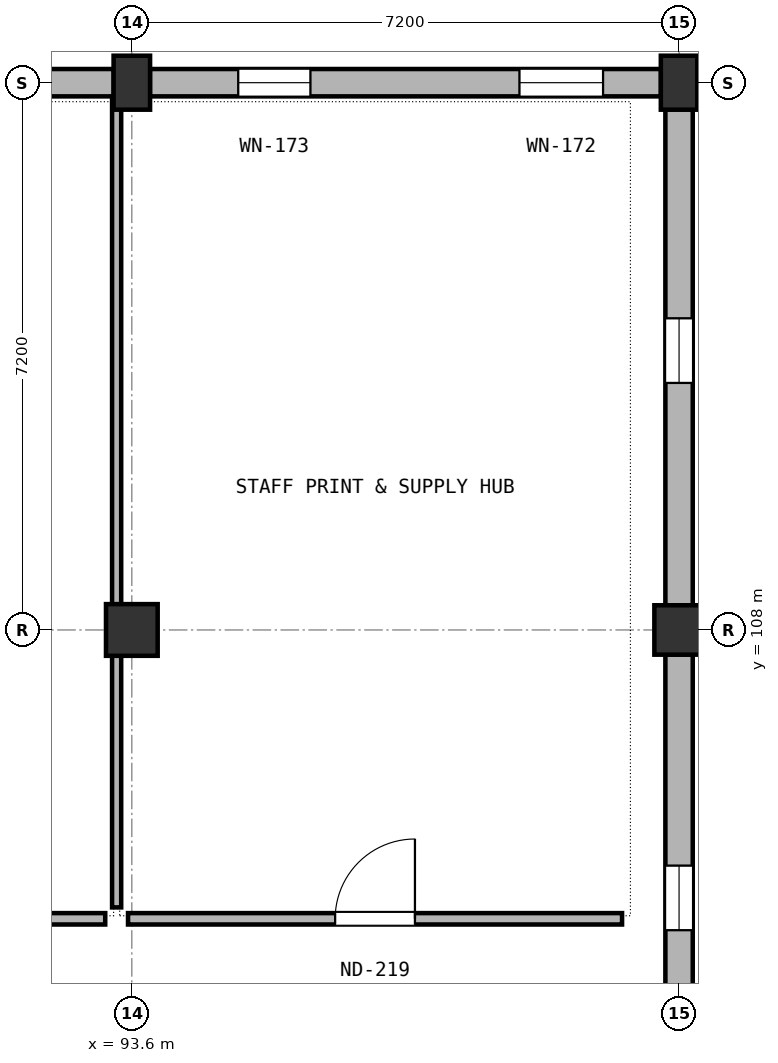
"""IFC4 building model, lengths in metres.
Left out: names, types, materials, properties, quantities, classifications, styles, units other than length and angle.
Written with IfcOpenShell. Run it as: python <this file> out.ifc"""

import sys

from ifc_helpers import new_model, si_unit, direction, frame, frame_2d, origin, origin_2d, place, context, subcontext, project, spatial, rectangle, extrude, element, fill, save


model = new_model("IFC4")
c1 = context("Model", 3, precision=1e-05, world=origin(), true_north=direction((0.0, 1.0)))
c2 = subcontext(c1, "Body", "Model", "MODEL_VIEW")
j1 = project(units=[si_unit("LENGTHUNIT", "METRE"), si_unit("PLANEANGLEUNIT", "RADIAN")], contexts=[c1])
p1 = place(None, origin())
s1 = spatial("IfcSite", under=j1, at=p1, CompositionType="ELEMENT")
p2 = place(p1, origin())
s2 = spatial("IfcBuilding", under=s1, at=p2, CompositionType="ELEMENT")
p3 = place(p2, frame((0.0, 0.0, 22.5)))
s3 = spatial("IfcBuildingStorey", under=s2, at=p3, CompositionType="ELEMENT", Elevation=22.5)
p4 = place(p3, frame((93.6, 108.0, 0.0), z_axis=(0.0, 0.0, 1.0), x_axis=(1.0, 0.0, 0.0)))
e1 = element("IfcColumn", 1, at=p4, inside=s3, PredefinedType="COLUMN", context=c2, shape_type="SweptSolid", body=[
    extrude(rectangle(XDim=0.68, YDim=0.68, at=origin_2d()), origin(), (0.0, 0.0, 1.0), 3.9),
])
p5 = place(p3, frame((93.6, 115.2, 0.0), z_axis=(0.0, 0.0, 1.0), x_axis=(1.0, 0.0, 0.0)))
e2 = element("IfcColumn", 2, at=p5, inside=s3, PredefinedType="COLUMN", context=c2, shape_type="SweptSolid", body=[
    extrude(rectangle(XDim=0.48, YDim=0.71, at=origin_2d()), origin(), (0.0, 0.0, 1.0), 3.9),
])
p6 = place(p3, frame((100.8, 108.0, 0.0), z_axis=(0.0, 0.0, 1.0), x_axis=(1.0, 0.0, 0.0)))
e3 = element("IfcColumn", 3, at=p6, inside=s3, PredefinedType="COLUMN", context=c2, shape_type="SweptSolid", body=[
    extrude(rectangle(XDim=0.65, YDim=0.65, at=origin_2d()), origin(), (0.0, 0.0, 1.0), 3.9),
])
p7 = place(p3, frame((100.8, 115.2, 0.0), z_axis=(0.0, 0.0, 1.0), x_axis=(1.0, 0.0, 0.0)))
e4 = element("IfcColumn", 4, at=p7, inside=s3, PredefinedType="COLUMN", context=c2, shape_type="SweptSolid", body=[
    extrude(rectangle(XDim=0.48, YDim=0.71, at=origin_2d()), origin(), (0.0, 0.0, 1.0), 3.9),
])
p8 = place(p3, frame((93.362, 115.2, 0.0), z_axis=(0.0, 0.0, 1.0), x_axis=(-1.0, 0.0, 0.0)))
e5 = element("IfcWall", 5, at=p8, inside=s3, PredefinedType="SOLIDWALL", context=c2, shape_type="SweptSolid", body=[
    extrude(rectangle(XDim=6.724, YDim=0.36, at=frame_2d((3.362, 0.0))), origin(), (0.0, 0.0, 1.0), 2.74),
])
p9 = place(p8, frame((0.912, 0.0, 0.7)))
e6 = element("IfcOpeningElement", 6, at=p9, cuts=e5, PredefinedType="OPENING", context=c2, shape_type="SweptSolid", body=[
    extrude(rectangle(XDim=1.1, YDim=1.84, at=frame_2d((0.55, 0.92))), frame((0.0, 0.19, 0.0), z_axis=(0.0, -1.0, 0.0), x_axis=(1.0, 0.0, 0.0)), (0.0, 0.0, 1.0), 0.38),
])
p10 = place(p8, frame((4.762, 0.0, 0.7)))
e7 = element("IfcOpeningElement", 7, at=p10, cuts=e5, PredefinedType="OPENING", context=c2, shape_type="SweptSolid", body=[
    extrude(rectangle(XDim=0.95, YDim=1.84, at=frame_2d((0.475, 0.92))), frame((0.0, 0.19, 0.0), z_axis=(0.0, -1.0, 0.0), x_axis=(1.0, 0.0, 0.0)), (0.0, 0.0, 1.0), 0.38),
])
p11 = place(p3, frame((100.562, 115.2, 0.0), z_axis=(0.0, 0.0, 1.0), x_axis=(-1.0, 0.0, 0.0)))
e8 = element("IfcWall", 8, at=p11, inside=s3, PredefinedType="SOLIDWALL", context=c2, shape_type="SweptSolid", body=[
    extrude(rectangle(XDim=6.724, YDim=0.36, at=frame_2d((3.362, 0.0))), origin(), (0.0, 0.0, 1.0), 2.74),
])
p12 = place(p11, frame((0.762, 0.0, 0.7)))
e9 = element("IfcOpeningElement", 9, at=p12, cuts=e8, PredefinedType="OPENING", context=c2, shape_type="SweptSolid", body=[
    extrude(rectangle(XDim=1.1, YDim=1.84, at=frame_2d((0.55, 0.92))), frame((0.0, 0.19, 0.0), z_axis=(0.0, -1.0, 0.0), x_axis=(1.0, 0.0, 0.0)), (0.0, 0.0, 1.0), 0.38),
])
p13 = place(p11, frame((4.612, 0.0, 0.7)))
e10 = element("IfcOpeningElement", 10, at=p13, cuts=e8, PredefinedType="OPENING", context=c2, shape_type="SweptSolid", body=[
    extrude(rectangle(XDim=0.95, YDim=1.84, at=frame_2d((0.475, 0.92))), frame((0.0, 0.19, 0.0), z_axis=(0.0, -1.0, 0.0), x_axis=(1.0, 0.0, 0.0)), (0.0, 0.0, 1.0), 0.38),
])
p14 = place(p3, frame((100.8, 107.677, 0.0), z_axis=(0.0, 0.0, 1.0), x_axis=(0.0, -1.0, 0.0)))
e11 = element("IfcWall", 11, at=p14, inside=s3, PredefinedType="SOLIDWALL", context=c2, shape_type="SweptSolid", body=[
    extrude(rectangle(XDim=6.554, YDim=0.36, at=frame_2d((3.277, 0.0))), origin(), (0.0, 0.0, 1.0), 2.74),
])
p15 = place(p14, frame((2.777, 0.0, 0.7)))
e12 = element("IfcOpeningElement", 12, at=p15, cuts=e11, PredefinedType="OPENING", context=c2, shape_type="SweptSolid", body=[
    extrude(rectangle(XDim=0.85, YDim=1.89, at=frame_2d((0.425, 0.945))), frame((0.0, 0.19, 0.0), z_axis=(0.0, -1.0, 0.0), x_axis=(1.0, 0.0, 0.0)), (0.0, 0.0, 1.0), 0.38),
])
p16 = place(p3, frame((100.8, 114.847, 0.0), z_axis=(0.0, 0.0, 1.0), x_axis=(0.0, -1.0, 0.0)))
e13 = element("IfcWall", 13, at=p16, inside=s3, PredefinedType="SOLIDWALL", context=c2, shape_type="SweptSolid", body=[
    extrude(rectangle(XDim=6.524, YDim=0.36, at=frame_2d((3.262, 0.0))), origin(), (0.0, 0.0, 1.0), 2.74),
])
p17 = place(p16, frame((2.747, 0.0, 0.7)))
e14 = element("IfcOpeningElement", 14, at=p17, cuts=e13, PredefinedType="OPENING", context=c2, shape_type="SweptSolid", body=[
    extrude(rectangle(XDim=0.85, YDim=1.89, at=frame_2d((0.425, 0.945))), frame((0.0, 0.19, 0.0), z_axis=(0.0, -1.0, 0.0), x_axis=(1.0, 0.0, 0.0)), (0.0, 0.0, 1.0), 0.38),
])
p18 = place(p3, frame((82.95, 104.2, 0.0), z_axis=(0.0, 0.0, 1.0), x_axis=(1.0, 0.0, 0.0)))
e15 = element("IfcWall", 15, at=p18, inside=s3, PredefinedType="PARTITIONING", context=c2, shape_type="SweptSolid", body=[
    extrude(rectangle(XDim=10.3, YDim=0.15, at=frame_2d((5.15, 0.0))), origin(), (0.0, 0.0, 1.0), 2.78),
])
p19 = place(p18, frame((4.65, 0.0, 0.0)))
e16 = element("IfcOpeningElement", 16, at=p19, cuts=e15, PredefinedType="OPENING", context=c2, shape_type="SweptSolid", body=[
    extrude(rectangle(XDim=1.0, YDim=2.15, at=frame_2d((0.5, 1.075))), frame((0.0, 0.085, 0.0), z_axis=(0.0, -1.0, 0.0), x_axis=(1.0, 0.0, 0.0)), (0.0, 0.0, 1.0), 0.17),
])
p20 = place(p3, frame((93.55, 104.2, 0.0), z_axis=(0.0, 0.0, 1.0), x_axis=(1.0, 0.0, 0.0)))
e17 = element("IfcWall", 17, at=p20, inside=s3, PredefinedType="PARTITIONING", context=c2, shape_type="SweptSolid", body=[
    extrude(rectangle(XDim=6.5, YDim=0.15, at=frame_2d((3.25, 0.0))), origin(), (0.0, 0.0, 1.0), 2.78),
])
p21 = place(p20, frame((2.725, 0.0, 0.0)))
e18 = element("IfcOpeningElement", 18, at=p21, cuts=e17, PredefinedType="OPENING", context=c2, shape_type="SweptSolid", body=[
    extrude(rectangle(XDim=1.05, YDim=2.15, at=frame_2d((0.525, 1.075))), frame((0.0, 0.085, 0.0), z_axis=(0.0, -1.0, 0.0), x_axis=(1.0, 0.0, 0.0)), (0.0, 0.0, 1.0), 0.17),
])
p22 = place(p3, frame((93.4, 104.35, 0.0), z_axis=(0.0, 0.0, 1.0), x_axis=(0.0, 1.0, 0.0)))
e19 = element("IfcWall", 19, at=p22, inside=s3, PredefinedType="PARTITIONING", context=c2, shape_type="SweptSolid", body=[
    extrude(rectangle(XDim=10.67, YDim=0.12, at=frame_2d((5.335, 0.0))), origin(), (0.0, 0.0, 1.0), 2.78),
])
p23 = place(p12, origin())
e20 = element("IfcWindow", 20, at=p23, inside=s3, PartitioningType="SINGLE_PANEL", PredefinedType="WINDOW", context=c2, shape_type="SweptSolid", body=[
    extrude(rectangle(XDim=1.1, YDim=1.84, at=frame_2d((0.55, 0.92))), frame((0.0, 0.03, 0.0), z_axis=(0.0, -1.0, 0.0), x_axis=(1.0, 0.0, 0.0)), (0.0, 0.0, 1.0), 0.06),
])
fill(e9, e20)
p24 = place(p13, origin())
e21 = element("IfcWindow", 21, at=p24, inside=s3, PartitioningType="SINGLE_PANEL", PredefinedType="WINDOW", context=c2, shape_type="SweptSolid", body=[
    extrude(rectangle(XDim=0.95, YDim=1.84, at=frame_2d((0.475, 0.92))), frame((0.0, 0.03, 0.0), z_axis=(0.0, -1.0, 0.0), x_axis=(1.0, 0.0, 0.0)), (0.0, 0.0, 1.0), 0.06),
])
fill(e10, e21)
p25 = place(p15, origin())
e22 = element("IfcWindow", 22, at=p25, inside=s3, PartitioningType="SINGLE_PANEL", PredefinedType="WINDOW", context=c2, shape_type="SweptSolid", body=[
    extrude(rectangle(XDim=0.85, YDim=1.89, at=frame_2d((0.425, 0.945))), frame((0.0, 0.03, 0.0), z_axis=(0.0, -1.0, 0.0), x_axis=(1.0, 0.0, 0.0)), (0.0, 0.0, 1.0), 0.06),
])
fill(e12, e22)
p26 = place(p17, origin())
e23 = element("IfcWindow", 23, at=p26, inside=s3, PartitioningType="SINGLE_PANEL", PredefinedType="WINDOW", context=c2, shape_type="SweptSolid", body=[
    extrude(rectangle(XDim=0.85, YDim=1.89, at=frame_2d((0.425, 0.945))), frame((0.0, 0.03, 0.0), z_axis=(0.0, -1.0, 0.0), x_axis=(1.0, 0.0, 0.0)), (0.0, 0.0, 1.0), 0.06),
])
fill(e14, e23)
p27 = place(p21, origin())
e24 = element("IfcDoor", 24, at=p27, inside=s3, OperationType="SINGLE_SWING_RIGHT", PredefinedType="DOOR", context=c2, shape_type="SweptSolid", body=[
    extrude(rectangle(XDim=1.05, YDim=2.15, at=frame_2d((0.525, 1.075))), frame((0.0, 0.025, 0.0), z_axis=(0.0, -1.0, 0.0), x_axis=(1.0, 0.0, 0.0)), (0.0, 0.0, 1.0), 0.05),
])
fill(e18, e24)
save(model, sys.argv[1])
